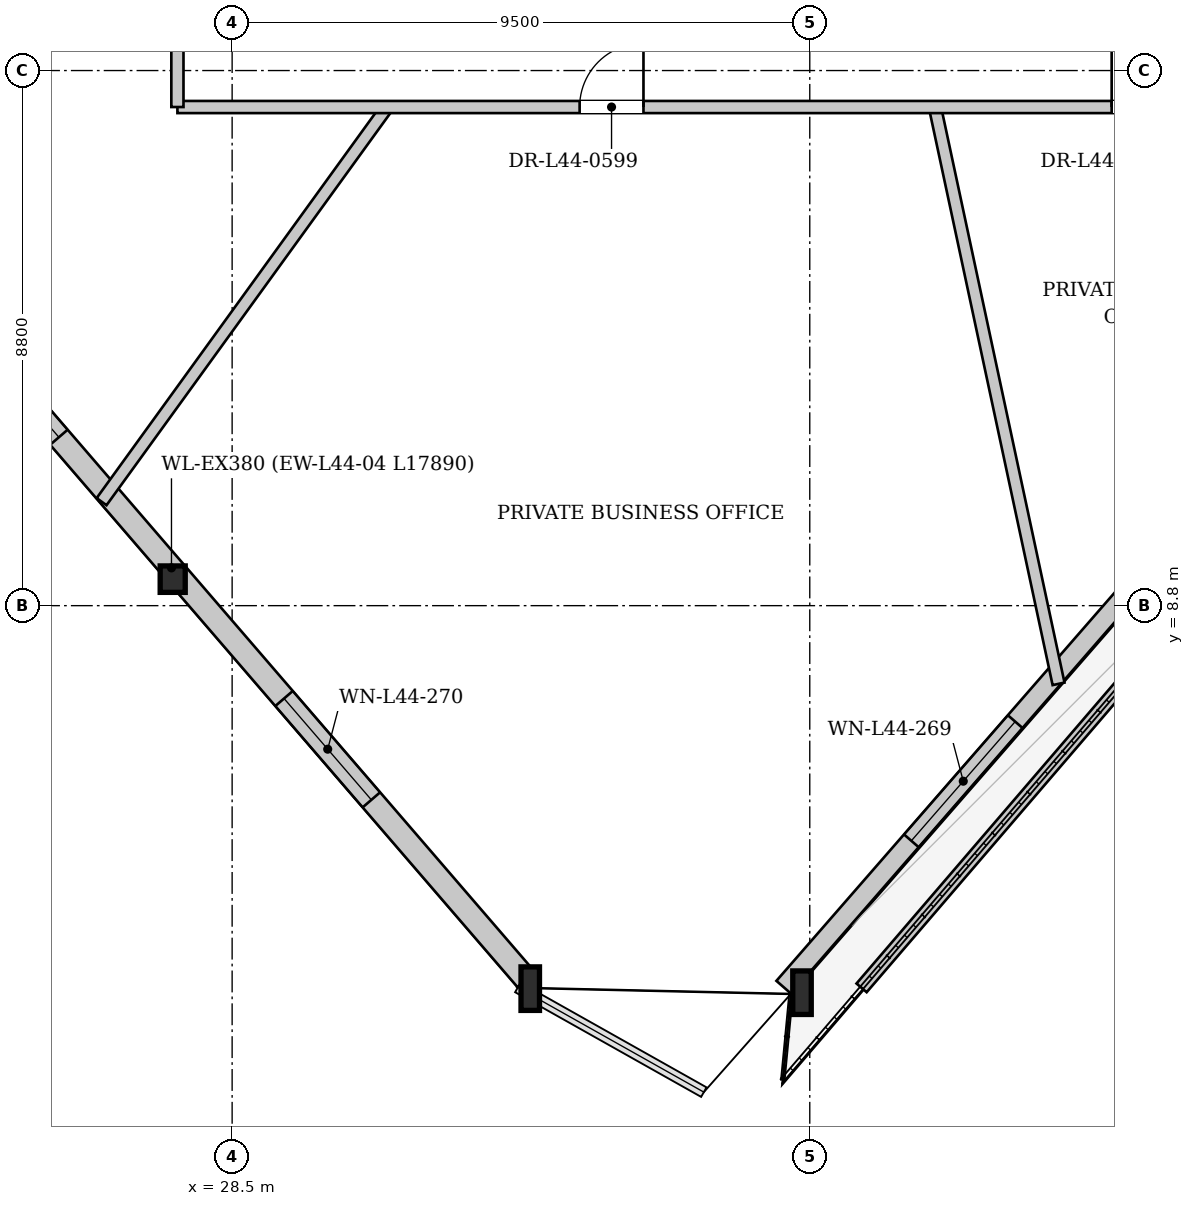
"""IFC4 building model, lengths in metres.
Left out: names, types, materials, properties, quantities, classifications, styles, units other than length and angle.
Written with IfcOpenShell. Run it as: python <this file> out.ifc"""

import sys

from ifc_helpers import new_model, si_unit, direction, frame, frame_2d, origin, origin_2d, place, context, subcontext, project, spatial, rectangle, i_section, extrude, source, transform, mapped, element, fill, save


model = new_model("IFC4")
c1 = context("Model", 3, precision=1e-05, world=origin(), true_north=direction((0.0, 1.0)))
c2 = subcontext(c1, "Body", "Model", "MODEL_VIEW")
j1 = project(units=[si_unit("LENGTHUNIT", "METRE"), si_unit("PLANEANGLEUNIT", "RADIAN")], contexts=[c1])
p1 = place(None, origin())
s1 = spatial("IfcSite", under=j1, at=p1, CompositionType="ELEMENT")
p2 = place(p1, origin())
s2 = spatial("IfcBuilding", under=s1, at=p2, CompositionType="ELEMENT")
p3 = place(p2, frame((0.0, 0.0, 167.9)))
s3 = spatial("IfcBuildingStorey", under=s2, at=p3, CompositionType="ELEMENT", Elevation=167.9)
m1 = source(origin(), c2, "Body", "SweptSolid", [
    extrude(i_section(OverallWidth=0.412, OverallDepth=0.435, WebThickness=0.031, FlangeThickness=0.05, at=origin_2d()), origin(), (0.0, 0.0, 1.0), 3.403),
])
p4 = place(p3, frame((27.358, 9.297, 0.0), z_axis=(0.096490730559, -0.03608538102, 0.994679538441), x_axis=(0.350283817475, 0.936643607364, 0.0)))
e1 = element("IfcColumn", 1, at=p4, inside=s3, PredefinedType="COLUMN", context=c2, shape_type="MappedRepresentation", body=[
    mapped(m1, transform((0.0, 0.0, 0.0), x_axis=(1.0, 0.0, 0.0), y_axis=(0.0, 1.0, 0.0), z_axis=(0.0, 0.0, 1.0), scale=1.0)),
])
m2 = source(origin(), c2, "Body", "SweptSolid", [
    extrude(i_section(OverallWidth=0.304, OverallDepth=0.716, WebThickness=0.021, FlangeThickness=0.04, at=origin_2d()), origin(), (0.0, 0.0, 1.0), 3.41),
])
p5 = place(p3, frame((33.198, 2.521, 0.0), z_axis=(0.120209949766, -0.011598577643, 0.992680734664), x_axis=(0.096039994691, 0.995377475845, 0.0)))
e2 = element("IfcColumn", 2, at=p5, inside=s3, PredefinedType="COLUMN", context=c2, shape_type="MappedRepresentation", body=[
    mapped(m2, transform((0.0, 0.0, 0.0), x_axis=(1.0, 0.0, 0.0), y_axis=(0.0, 1.0, 0.0), z_axis=(0.0, 0.0, 1.0), scale=1.0)),
])
m3 = source(origin(), c2, "Body", "SweptSolid", [
    extrude(i_section(OverallWidth=0.304, OverallDepth=0.716, WebThickness=0.021, FlangeThickness=0.04, at=origin_2d()), origin(), (0.0, 0.0, 1.0), 3.404),
])
p6 = place(p3, frame((37.692, 2.419, 0.0), z_axis=(0.105710612855, 0.009251471546, 0.994353899074), x_axis=(-0.08718371796, 0.996192250182, 0.0)))
e3 = element("IfcColumn", 3, at=p6, inside=s3, PredefinedType="COLUMN", context=c2, shape_type="MappedRepresentation", body=[
    mapped(m3, transform((0.0, 0.0, 0.0), x_axis=(1.0, 0.0, 0.0), y_axis=(0.0, 1.0, 0.0), z_axis=(0.0, 0.0, 1.0), scale=1.0)),
])
p7 = place(p3, frame((52.97, 20.198, 0.0), z_axis=(0.0, 0.0, 1.0), x_axis=(-0.656914851648, -0.753964772177, 0.0)))
e4 = element("IfcWall", 4, at=p7, inside=s3, PredefinedType="SOLIDWALL", context=c2, shape_type="SweptSolid", body=[
    extrude(rectangle(XDim=23.44, YDim=0.32, at=frame_2d((11.72, 0.0))), origin(), (0.0, 0.0, 1.0), 2.722),
])
p8 = place(p7, frame((6.751, 0.0, 0.0)))
e5 = element("IfcOpeningElement", 5, at=p8, cuts=e4, PredefinedType="OPENING", context=c2, shape_type="SweptSolid", body=[
    extrude(rectangle(XDim=1.5, YDim=2.3, at=frame_2d((0.75, 1.15))), frame((0.0, 0.17, 0.0), z_axis=(0.0, -1.0, 0.0), x_axis=(1.0, 0.0, 0.0)), (0.0, 0.0, 1.0), 0.34),
])
p9 = place(p7, frame((17.646, 0.0, 0.252)))
e6 = element("IfcOpeningElement", 6, at=p9, cuts=e4, PredefinedType="OPENING", context=c2, shape_type="SweptSolid", body=[
    extrude(rectangle(XDim=2.6, YDim=2.35, at=frame_2d((1.3, 1.175))), frame((0.0, 0.17, 0.0), z_axis=(0.0, -1.0, 0.0), x_axis=(1.0, 0.0, 0.0)), (0.0, 0.0, 1.0), 0.34),
])
p10 = place(p3, frame((33.342, 2.646, 0.0), z_axis=(0.0, 0.0, 1.0), x_axis=(-0.652817593777, 0.757515141271, 0.0)))
e7 = element("IfcWall", 7, at=p10, inside=s3, PredefinedType="SOLIDWALL", context=c2, shape_type="SweptSolid", body=[
    extrude(rectangle(XDim=17.89, YDim=0.38, at=frame_2d((8.945, 0.0))), origin(), (0.0, 0.0, 1.0), 2.722),
])
p11 = place(p10, frame((3.909, 0.0, 0.352)))
e8 = element("IfcOpeningElement", 8, at=p11, cuts=e7, PredefinedType="OPENING", context=c2, shape_type="SweptSolid", body=[
    extrude(rectangle(XDim=2.2, YDim=2.25, at=frame_2d((1.1, 1.125))), frame((0.0, 0.2, 0.0), z_axis=(0.0, -1.0, 0.0), x_axis=(1.0, 0.0, 0.0)), (0.0, 0.0, 1.0), 0.4),
])
p12 = place(p10, frame((11.781, 0.0, 0.352)))
e9 = element("IfcOpeningElement", 9, at=p12, cuts=e7, PredefinedType="OPENING", context=c2, shape_type="SweptSolid", body=[
    extrude(rectangle(XDim=2.2, YDim=2.25, at=frame_2d((1.1, 1.125))), frame((0.0, 0.2, 0.0), z_axis=(0.0, -1.0, 0.0), x_axis=(1.0, 0.0, 0.0)), (0.0, 0.0, 1.0), 0.4),
])
p13 = place(p3, frame((38.852, 2.514, 0.0), z_axis=(0.0, 0.0, 1.0), x_axis=(0.651493813463, 0.758653946816, 0.0)))
e10 = element("IfcWall", 10, at=p13, inside=s3, PredefinedType="PARAPET", context=c2, shape_type="SweptSolid", body=[
    extrude(rectangle(XDim=20.858, YDim=0.22, at=frame_2d((10.429, 0.0))), origin(), (0.0, 0.0, 1.0), 0.3),
])
p14 = place(p3, frame((31.051, 17.0, 0.0), z_axis=(0.0, 0.0, 1.0), x_axis=(-0.58638917402, -0.810029466496, 0.0)))
e11 = element("IfcWall", 11, at=p14, inside=s3, PredefinedType="PARTITIONING", context=c2, shape_type="SweptSolid", body=[
    extrude(rectangle(XDim=8.012, YDim=0.2, at=frame_2d((4.006, 0.0))), origin(), (0.0, 0.0, 1.0), 3.33),
])
p15 = place(p3, frame((40.058, 17.0, 0.0), z_axis=(0.0, 0.0, 1.0), x_axis=(0.209628767646, -0.977781048996, 0.0)))
e12 = element("IfcWall", 12, at=p15, inside=s3, PredefinedType="PARTITIONING", context=c2, shape_type="SweptSolid", body=[
    extrude(rectangle(XDim=9.701, YDim=0.2, at=frame_2d((4.851, 0.0))), origin(), (0.0, 0.0, 1.0), 3.33),
])
p16 = place(p3, frame((27.6, 17.0, 0.0), z_axis=(0.0, 0.0, 1.0), x_axis=(1.0, 0.0, 0.0)))
e13 = element("IfcWall", 13, at=p16, inside=s3, PredefinedType="PARTITIONING", context=c2, shape_type="SweptSolid", body=[
    extrude(rectangle(XDim=20.8, YDim=0.2, at=frame_2d((10.4, 0.0))), origin(), (0.0, 0.0, 1.0), 3.33),
])
p17 = place(p16, frame((6.615, 0.0, 0.0)))
e14 = element("IfcOpeningElement", 14, at=p17, cuts=e13, PredefinedType="OPENING", context=c2, shape_type="SweptSolid", body=[
    extrude(rectangle(XDim=1.05, YDim=2.2, at=frame_2d((0.525, 1.1))), frame((0.0, 0.11, 0.0), z_axis=(0.0, -1.0, 0.0), x_axis=(1.0, 0.0, 0.0)), (0.0, 0.0, 1.0), 0.22),
])
p18 = place(p16, frame((15.365, 0.0, 0.0)))
e15 = element("IfcOpeningElement", 15, at=p18, cuts=e13, PredefinedType="OPENING", context=c2, shape_type="SweptSolid", body=[
    extrude(rectangle(XDim=1.05, YDim=2.2, at=frame_2d((0.525, 1.1))), frame((0.0, 0.11, 0.0), z_axis=(0.0, -1.0, 0.0), x_axis=(1.0, 0.0, 0.0)), (0.0, 0.0, 1.0), 0.22),
])
p19 = place(p3, frame((27.6, 17.0, 0.0), z_axis=(0.0, 0.0, 1.0), x_axis=(0.0, 1.0, 0.0)))
e16 = element("IfcWall", 16, at=p19, inside=s3, PredefinedType="PARTITIONING", context=c2, shape_type="SweptSolid", body=[
    extrude(rectangle(XDim=19.2, YDim=0.2, at=frame_2d((9.6, 0.0))), origin(), (0.0, 0.0, 1.0), 3.33),
])
p20 = place(p19, frame((7.326, 0.0, 0.0)))
e17 = element("IfcOpeningElement", 17, at=p20, cuts=e16, PredefinedType="OPENING", context=c2, shape_type="SweptSolid", body=[
    extrude(rectangle(XDim=1.05, YDim=2.2, at=frame_2d((0.525, 1.1))), frame((0.0, 0.11, 0.0), z_axis=(0.0, -1.0, 0.0), x_axis=(1.0, 0.0, 0.0)), (0.0, 0.0, 1.0), 0.22),
])
m4 = source(origin(), c2, "Body", "SweptSolid", [
    extrude(rectangle(XDim=2.6, YDim=2.35, at=frame_2d((1.3, 1.175))), frame((0.0, 0.03, 0.0), z_axis=(0.0, -1.0, 0.0), x_axis=(1.0, 0.0, 0.0)), (0.0, 0.0, 1.0), 0.06),
])
p21 = place(p9, origin())
e18 = element("IfcWindow", 18, at=p21, inside=s3, PartitioningType="SINGLE_PANEL", PredefinedType="WINDOW", context=c2, shape_type="MappedRepresentation", body=[
    mapped(m4, transform((0.0, 0.0, 0.0), x_axis=(1.0, 0.0, 0.0), y_axis=(0.0, 1.0, 0.0), z_axis=(0.0, 0.0, 1.0), scale=1.0)),
])
fill(e6, e18)
m5 = source(origin(), c2, "Body", "SweptSolid", [
    extrude(rectangle(XDim=2.2, YDim=2.25, at=frame_2d((1.1, 1.125))), frame((0.0, 0.03, 0.0), z_axis=(0.0, -1.0, 0.0), x_axis=(1.0, 0.0, 0.0)), (0.0, 0.0, 1.0), 0.06),
])
p22 = place(p11, origin())
e19 = element("IfcWindow", 19, at=p22, inside=s3, PartitioningType="SINGLE_PANEL", PredefinedType="WINDOW", context=c2, shape_type="MappedRepresentation", body=[
    mapped(m5, transform((0.0, 0.0, 0.0), x_axis=(1.0, 0.0, 0.0), y_axis=(0.0, 1.0, 0.0), z_axis=(0.0, 0.0, 1.0), scale=1.0)),
])
fill(e8, e19)
p23 = place(p12, origin())
e20 = element("IfcWindow", 20, at=p23, inside=s3, PartitioningType="SINGLE_PANEL", PredefinedType="WINDOW", context=c2, shape_type="MappedRepresentation", body=[
    mapped(m5, transform((0.0, 0.0, 0.0), x_axis=(1.0, 0.0, 0.0), y_axis=(0.0, 1.0, 0.0), z_axis=(0.0, 0.0, 1.0), scale=1.0)),
])
fill(e9, e20)
m6 = source(origin(), c2, "Body", "SweptSolid", [
    extrude(rectangle(XDim=1.05, YDim=2.2, at=frame_2d((0.525, 1.1))), frame((0.0, 0.025, 0.0), z_axis=(0.0, -1.0, 0.0), x_axis=(1.0, 0.0, 0.0)), (0.0, 0.0, 1.0), 0.05),
])
p24 = place(p17, origin())
e21 = element("IfcDoor", 21, at=p24, inside=s3, OperationType="SINGLE_SWING_RIGHT", PredefinedType="DOOR", context=c2, shape_type="MappedRepresentation", body=[
    mapped(m6, transform((0.0, 0.0, 0.0), x_axis=(1.0, 0.0, 0.0), y_axis=(0.0, 1.0, 0.0), z_axis=(0.0, 0.0, 1.0), scale=1.0)),
])
fill(e14, e21)
p25 = place(p18, origin())
e22 = element("IfcDoor", 22, at=p25, inside=s3, OperationType="SINGLE_SWING_LEFT", PredefinedType="DOOR", context=c2, shape_type="MappedRepresentation", body=[
    mapped(m6, transform((0.0, 0.0, 0.0), x_axis=(1.0, 0.0, 0.0), y_axis=(0.0, 1.0, 0.0), z_axis=(0.0, 0.0, 1.0), scale=1.0)),
])
fill(e15, e22)
save(model, sys.argv[1])
